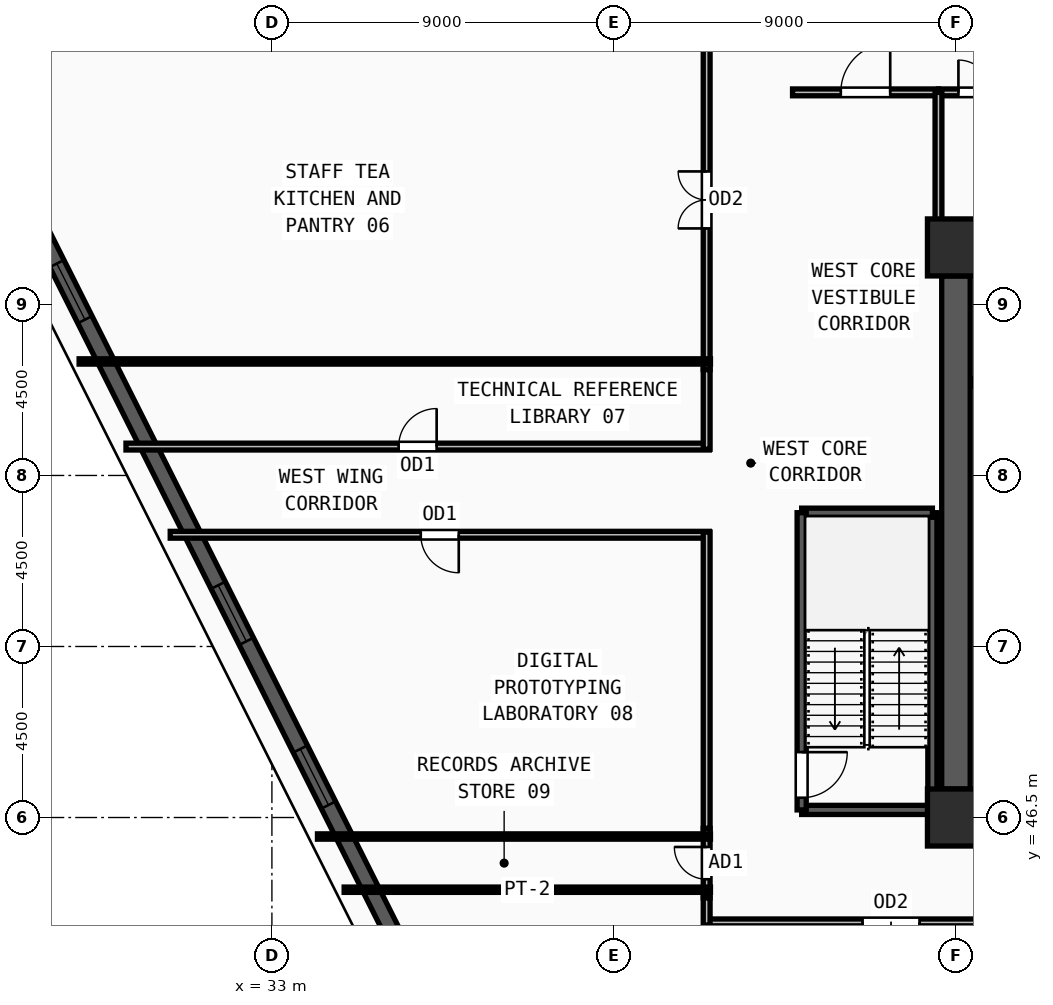
"""IFC4 building model, lengths in metres.
Left out: names, types, materials, properties, quantities, classifications, styles, units other than length and angle.
Written with IfcOpenShell. Run it as: python <this file> out.ifc"""

import sys

from ifc_helpers import new_model, si_unit, direction, frame, frame_2d, origin, origin_2d, place, context, subcontext, project, spatial, rectangle, extrude, source, transform, mapped, element, fill, save


model = new_model("IFC4")
c1 = context("Model", 3, precision=1e-05, world=origin(), true_north=direction((0.0, 1.0)))
c2 = subcontext(c1, "Body", "Model", "MODEL_VIEW")
j1 = project(units=[si_unit("LENGTHUNIT", "METRE"), si_unit("PLANEANGLEUNIT", "RADIAN")], contexts=[c1])
p1 = place(None, origin())
s1 = spatial("IfcSite", under=j1, at=p1, CompositionType="ELEMENT")
p2 = place(p1, origin())
s2 = spatial("IfcBuilding", under=s1, at=p2, CompositionType="ELEMENT")
p3 = place(p2, frame((0.0, 0.0, 124.5)))
s3 = spatial("IfcBuildingStorey", under=s2, at=p3, CompositionType="ELEMENT", Elevation=124.5)
m1 = source(origin(), c2, "Body", "SweptSolid", [
    extrude(rectangle(XDim=1.5, YDim=1.5, at=origin_2d()), origin(), (0.0, 0.0, 1.0), 3.75),
])
for number, where, z_axis, x_axis in (
    (1, (51.0, 46.5, 0.0), (0.0, 0.0, 1.0), (1.0, 0.0, 0.0)),
    (2, (51.0, 61.5, 0.0), (0.0, 0.0, 1.0), (1.0, 0.0, 0.0)),
):
    element("IfcColumn", number, at=place(p3, frame(where, z_axis=z_axis, x_axis=x_axis)), inside=s3, PredefinedType="COLUMN", context=c2, shape_type="MappedRepresentation", body=[
        mapped(m1, transform((0.0, 0.0, 0.0), x_axis=(1.0, 0.0, 0.0), y_axis=(0.0, 1.0, 0.0), z_axis=(0.0, 0.0, 1.0), scale=1.0)),
    ])
p4 = place(p3, frame((24.158, 67.415, 0.0), z_axis=(0.0, 0.0, 1.0), x_axis=(0.448489429893, -0.893788135564, 0.0)))
e3 = element("IfcWall", 3, at=p4, inside=s3, PredefinedType="SOLIDWALL", context=c2, shape_type="SweptSolid", body=[
    extrude(rectangle(XDim=31.677, YDim=0.42, at=frame_2d((15.839, 0.0))), origin(), (0.0, 0.0, 1.0), 3.57),
])
m2 = source(origin(), c2, "Body", "SweptSolid", [
    extrude(rectangle(XDim=1.65, YDim=1.95, at=frame_2d((0.825, 0.975))), frame((0.0, 0.22, 0.0), z_axis=(0.0, -1.0, 0.0), x_axis=(1.0, 0.0, 0.0)), (0.0, 0.0, 1.0), 0.44),
])
p5 = place(p4, frame((7.094, 0.0, 0.55)))
e4 = element("IfcOpeningElement", 4, at=p5, cuts=e3, PredefinedType="OPENING", context=c2, shape_type="MappedRepresentation", body=[
    mapped(m2, transform((0.0, 0.0, 0.0), x_axis=(1.0, 0.0, 0.0), y_axis=(0.0, 1.0, 0.0), z_axis=(0.0, 0.0, 1.0), scale=1.0)),
])
p6 = place(p4, frame((16.564, 0.0, 0.55)))
e5 = element("IfcOpeningElement", 5, at=p6, cuts=e3, PredefinedType="OPENING", context=c2, shape_type="MappedRepresentation", body=[
    mapped(m2, transform((0.0, 0.0, 0.0), x_axis=(1.0, 0.0, 0.0), y_axis=(0.0, 1.0, 0.0), z_axis=(0.0, 0.0, 1.0), scale=1.0)),
])
p7 = place(p4, frame((21.383, 0.0, 0.55)))
e6 = element("IfcOpeningElement", 6, at=p7, cuts=e3, PredefinedType="OPENING", context=c2, shape_type="MappedRepresentation", body=[
    mapped(m2, transform((0.0, 0.0, 0.0), x_axis=(1.0, 0.0, 0.0), y_axis=(0.0, 1.0, 0.0), z_axis=(0.0, 0.0, 1.0), scale=1.0)),
])
p8 = place(p3, frame((51.0, 47.25, 0.0), z_axis=(0.0, 0.0, 1.0), x_axis=(0.0, 1.0, 0.0)))
e7 = element("IfcWall", 7, at=p8, inside=s3, PredefinedType="SHEAR", context=c2, shape_type="SweptSolid", body=[
    extrude(rectangle(XDim=13.5, YDim=0.75, at=frame_2d((6.75, 0.0))), origin(), (0.0, 0.0, 1.0), 3.57),
])
p9 = place(p3, frame((46.94, 46.7, 0.0), z_axis=(0.0, 0.0, 1.0), x_axis=(1.0, 0.0, 0.0)))
e8 = element("IfcWall", 8, at=p9, inside=s3, PredefinedType="SOLIDWALL", context=c2, shape_type="SweptSolid", body=[
    extrude(rectangle(XDim=3.44, YDim=0.24, at=frame_2d((1.72, 0.0))), origin(), (0.0, 0.0, 1.0), 3.57),
])
p10 = place(p3, frame((50.38, 46.7, 0.0), z_axis=(0.0, 0.0, 1.0), x_axis=(0.0, 1.0, 0.0)))
e9 = element("IfcWall", 9, at=p10, inside=s3, PredefinedType="SOLIDWALL", context=c2, shape_type="SweptSolid", body=[
    extrude(rectangle(XDim=7.82, YDim=0.24, at=frame_2d((3.91, 0.0))), origin(), (0.0, 0.0, 1.0), 3.57),
])
p11 = place(p3, frame((50.38, 54.52, 0.0), z_axis=(0.0, 0.0, 1.0), x_axis=(-1.0, 0.0, 0.0)))
e10 = element("IfcWall", 10, at=p11, inside=s3, PredefinedType="SOLIDWALL", context=c2, shape_type="SweptSolid", body=[
    extrude(rectangle(XDim=3.44, YDim=0.24, at=frame_2d((1.72, 0.0))), origin(), (0.0, 0.0, 1.0), 3.57),
])
p12 = place(p3, frame((46.94, 54.52, 0.0), z_axis=(0.0, 0.0, 1.0), x_axis=(0.0, -1.0, 0.0)))
e11 = element("IfcWall", 11, at=p12, inside=s3, PredefinedType="SOLIDWALL", context=c2, shape_type="SweptSolid", body=[
    extrude(rectangle(XDim=7.82, YDim=0.24, at=frame_2d((3.91, 0.0))), origin(), (0.0, 0.0, 1.0), 3.57),
])
m3 = source(origin(), c2, "Body", "SweptSolid", [
    extrude(rectangle(XDim=1.2, YDim=2.2, at=frame_2d((0.6, 1.1))), frame((0.0, 0.13, 0.0), z_axis=(0.0, -1.0, 0.0), x_axis=(1.0, 0.0, 0.0)), (0.0, 0.0, 1.0), 0.26),
])
p13 = place(p12, frame((6.3, 0.0, 0.0)))
e12 = element("IfcOpeningElement", 12, at=p13, cuts=e11, PredefinedType="OPENING", context=c2, shape_type="MappedRepresentation", body=[
    mapped(m3, transform((0.0, 0.0, 0.0), x_axis=(1.0, 0.0, 0.0), y_axis=(0.0, 1.0, 0.0), z_axis=(0.0, 0.0, 1.0), scale=1.0)),
])
for number, where, z_axis, x_axis in (
    (13, (51.4, 57.95, 0.0), (0.0, 0.0, 1.0), (1.0, 0.0, 0.0)),
    (14, (53.8, 60.88, 0.0), (0.0, 0.0, 1.0), (-1.0, 0.0, 0.0)),
):
    element("IfcWall", number, at=place(p3, frame(where, z_axis=z_axis, x_axis=x_axis)), inside=s3, PredefinedType="SOLIDWALL", context=c2, shape_type="SweptSolid", body=[
        extrude(rectangle(XDim=2.4, YDim=0.2, at=frame_2d((1.2, 0.0))), origin(), (0.0, 0.0, 1.0), 3.57),
    ])
p14 = place(p3, frame((50.54, 65.58, 0.0), z_axis=(0.0, 0.0, 1.0), x_axis=(1.0, 0.0, 0.0)))
e15 = element("IfcWall", 15, at=p14, inside=s3, PredefinedType="PARTITIONING", context=c2, shape_type="SweptSolid", body=[
    extrude(rectangle(XDim=1.9, YDim=0.18, at=frame_2d((0.95, 0.0))), origin(), (0.0, 0.0, 1.0), 3.57),
])
m4 = source(origin(), c2, "Body", "SweptSolid", [
    extrude(rectangle(XDim=0.85, YDim=2.1, at=frame_2d((0.425, 1.05))), frame((0.0, 0.1, 0.0), z_axis=(0.0, -1.0, 0.0), x_axis=(1.0, 0.0, 0.0)), (0.0, 0.0, 1.0), 0.2),
])
p15 = place(p14, frame((0.525, 0.0, 0.0)))
e16 = element("IfcOpeningElement", 16, at=p15, cuts=e15, PredefinedType="OPENING", context=c2, shape_type="MappedRepresentation", body=[
    mapped(m4, transform((0.0, 0.0, 0.0), x_axis=(1.0, 0.0, 0.0), y_axis=(0.0, 1.0, 0.0), z_axis=(0.0, 0.0, 1.0), scale=1.0)),
])
p16 = place(p3, frame((46.7, 65.58, 0.0), z_axis=(0.0, 0.0, 1.0), x_axis=(1.0, 0.0, 0.0)))
e17 = element("IfcWall", 17, at=p16, inside=s3, PredefinedType="PARTITIONING", context=c2, shape_type="SweptSolid", body=[
    extrude(rectangle(XDim=3.84, YDim=0.18, at=frame_2d((1.92, 0.0))), origin(), (0.0, 0.0, 1.0), 3.57),
])
m5 = source(origin(), c2, "Body", "SweptSolid", [
    extrude(rectangle(XDim=1.3, YDim=2.2, at=frame_2d((0.65, 1.1))), frame((0.0, 0.1, 0.0), z_axis=(0.0, -1.0, 0.0), x_axis=(1.0, 0.0, 0.0)), (0.0, 0.0, 1.0), 0.2),
])
p17 = place(p16, frame((1.27, 0.0, 0.0)))
e18 = element("IfcOpeningElement", 18, at=p17, cuts=e17, PredefinedType="OPENING", context=c2, shape_type="MappedRepresentation", body=[
    mapped(m5, transform((0.0, 0.0, 0.0), x_axis=(1.0, 0.0, 0.0), y_axis=(0.0, 1.0, 0.0), z_axis=(0.0, 0.0, 1.0), scale=1.0)),
])
p18 = place(p3, frame((44.44, 58.285, 0.0), z_axis=(0.0, 0.0, 1.0), x_axis=(0.0, 1.0, 0.0)))
e19 = element("IfcWall", 19, at=p18, inside=s3, PredefinedType="PARTITIONING", context=c2, shape_type="SweptSolid", body=[
    extrude(rectangle(XDim=8.93, YDim=0.18, at=frame_2d((4.465, 0.0))), origin(), (0.0, 0.0, 1.0), 3.57),
])
m6 = source(origin(), c2, "Body", "SweptSolid", [
    extrude(rectangle(XDim=1.5, YDim=2.2, at=frame_2d((0.75, 1.1))), frame((0.0, 0.1, 0.0), z_axis=(0.0, -1.0, 0.0), x_axis=(1.0, 0.0, 0.0)), (0.0, 0.0, 1.0), 0.2),
])
p19 = place(p18, frame((3.715, 0.0, 0.0)))
e20 = element("IfcOpeningElement", 20, at=p19, cuts=e19, PredefinedType="OPENING", context=c2, shape_type="MappedRepresentation", body=[
    mapped(m6, transform((0.0, 0.0, 0.0), x_axis=(1.0, 0.0, 0.0), y_axis=(0.0, 1.0, 0.0), z_axis=(0.0, 0.0, 1.0), scale=1.0)),
])
p20 = place(p3, frame((29.16, 56.26, 0.0), z_axis=(0.0, 0.0, 1.0), x_axis=(1.0, 0.0, 0.0)))
e21 = element("IfcWall", 21, at=p20, inside=s3, PredefinedType="PARTITIONING", context=c2, shape_type="SweptSolid", body=[
    extrude(rectangle(XDim=15.35, YDim=0.18, at=frame_2d((7.675, 0.0))), origin(), (0.0, 0.0, 1.0), 3.57),
])
m7 = source(origin(), c2, "Body", "SweptSolid", [
    extrude(rectangle(XDim=1.0, YDim=2.2, at=frame_2d((0.5, 1.1))), frame((0.0, 0.1, 0.0), z_axis=(0.0, -1.0, 0.0), x_axis=(1.0, 0.0, 0.0)), (0.0, 0.0, 1.0), 0.2),
])
p21 = place(p20, frame((7.175, 0.0, 0.0)))
e22 = element("IfcOpeningElement", 22, at=p21, cuts=e21, PredefinedType="OPENING", context=c2, shape_type="MappedRepresentation", body=[
    mapped(m7, transform((0.0, 0.0, 0.0), x_axis=(1.0, 0.0, 0.0), y_axis=(0.0, 1.0, 0.0), z_axis=(0.0, 0.0, 1.0), scale=1.0)),
])
p22 = place(p3, frame((44.51, 53.94, 0.0), z_axis=(0.0, 0.0, 1.0), x_axis=(-1.0, 0.0, 0.0)))
e23 = element("IfcWall", 23, at=p22, inside=s3, PredefinedType="PARTITIONING", context=c2, shape_type="SweptSolid", body=[
    extrude(rectangle(XDim=14.186, YDim=0.18, at=frame_2d((7.093, 0.0))), origin(), (0.0, 0.0, 1.0), 3.57),
])
p23 = place(p22, frame((6.593, 0.0, 0.0)))
e24 = element("IfcOpeningElement", 24, at=p23, cuts=e23, PredefinedType="OPENING", context=c2, shape_type="MappedRepresentation", body=[
    mapped(m7, transform((0.0, 0.0, 0.0), x_axis=(1.0, 0.0, 0.0), y_axis=(0.0, 1.0, 0.0), z_axis=(0.0, 0.0, 1.0), scale=1.0)),
])
p24 = place(p3, frame((44.44, 44.385, 0.0), z_axis=(0.0, 0.0, 1.0), x_axis=(0.0, 1.0, 0.0)))
e25 = element("IfcWall", 25, at=p24, inside=s3, PredefinedType="PARTITIONING", context=c2, shape_type="SweptSolid", body=[
    extrude(rectangle(XDim=1.83, YDim=0.18, at=frame_2d((0.915, 0.0))), origin(), (0.0, 0.0, 1.0), 3.57),
])
p25 = place(p24, frame((0.49, 0.0, 0.0)))
e26 = element("IfcOpeningElement", 26, at=p25, cuts=e25, PredefinedType="OPENING", context=c2, shape_type="MappedRepresentation", body=[
    mapped(m4, transform((0.0, 0.0, 0.0), x_axis=(1.0, 0.0, 0.0), y_axis=(0.0, 1.0, 0.0), z_axis=(0.0, 0.0, 1.0), scale=1.0)),
])
p26 = place(p3, frame((54.215, 43.74, 0.0), z_axis=(0.0, 0.0, 1.0), x_axis=(-1.0, 0.0, 0.0)))
e27 = element("IfcWall", 27, at=p26, inside=s3, PredefinedType="PARTITIONING", context=c2, shape_type="SweptSolid", body=[
    extrude(rectangle(XDim=9.845, YDim=0.18, at=frame_2d((4.922, 0.0))), origin(), (0.0, 0.0, 1.0), 3.57),
])
p27 = place(p26, frame((4.173, 0.0, 0.0)))
e28 = element("IfcOpeningElement", 28, at=p27, cuts=e27, PredefinedType="OPENING", context=c2, shape_type="MappedRepresentation", body=[
    mapped(m6, transform((0.0, 0.0, 0.0), x_axis=(1.0, 0.0, 0.0), y_axis=(0.0, 1.0, 0.0), z_axis=(0.0, 0.0, 1.0), scale=1.0)),
])
p28 = place(p3, frame((50.54, 61.95, 0.0), z_axis=(0.0, 0.0, 1.0), x_axis=(0.0, 1.0, 0.0)))
e29 = element("IfcWall", 29, at=p28, inside=s3, PredefinedType="PARTITIONING", context=c2, shape_type="SweptSolid", body=[
    extrude(rectangle(XDim=3.63, YDim=0.18, at=frame_2d((1.815, 0.0))), origin(), (0.0, 0.0, 1.0), 3.57),
])
p29 = place(p3, frame((44.44, 56.19, 0.0), z_axis=(0.0, 0.0, 1.0), x_axis=(0.0, 1.0, 0.0)))
e30 = element("IfcWall", 30, at=p29, inside=s3, PredefinedType="PARTITIONING", context=c2, shape_type="SweptSolid", body=[
    extrude(rectangle(XDim=2.095, YDim=0.18, at=frame_2d((1.047, 0.0))), origin(), (0.0, 0.0, 1.0), 3.57),
])
p30 = place(p3, frame((44.44, 46.215, 0.0), z_axis=(0.0, 0.0, 1.0), x_axis=(0.0, 1.0, 0.0)))
e31 = element("IfcWall", 31, at=p30, inside=s3, PredefinedType="PARTITIONING", context=c2, shape_type="SweptSolid", body=[
    extrude(rectangle(XDim=7.795, YDim=0.18, at=frame_2d((3.897, 0.0))), origin(), (0.0, 0.0, 1.0), 3.57),
])
p31 = place(p3, frame((44.44, 43.67, 0.0), z_axis=(0.0, 0.0, 1.0), x_axis=(0.0, 1.0, 0.0)))
e32 = element("IfcWall", 32, at=p31, inside=s3, PredefinedType="PARTITIONING", context=c2, shape_type="SweptSolid", body=[
    extrude(rectangle(XDim=0.715, YDim=0.18, at=frame_2d((0.357, 0.0))), origin(), (0.0, 0.0, 1.0), 3.57),
])
p32 = place(p3, frame((44.54, 44.6, 0.0), z_axis=(0.0, 0.0, 1.0), x_axis=(-1.0, 0.0, 0.0)))
e33 = element("IfcWall", 33, at=p32, inside=s3, PredefinedType="PARTITIONING", context=c2, shape_type="SweptSolid", body=[
    extrude(rectangle(XDim=9.639, YDim=0.14, at=frame_2d((4.82, 0.0))), origin(), (0.0, 0.0, 1.0), 3.57),
])
p33 = place(p3, frame((44.54, 46.0, 0.0), z_axis=(0.0, 0.0, 1.0), x_axis=(-1.0, 0.0, 0.0)))
e34 = element("IfcWall", 34, at=p33, inside=s3, PredefinedType="PARTITIONING", context=c2, shape_type="SweptSolid", body=[
    extrude(rectangle(XDim=10.341, YDim=0.14, at=frame_2d((5.17, 0.0))), origin(), (0.0, 0.0, 1.0), 3.57),
])
p34 = place(p3, frame((44.54, 58.5, 0.0), z_axis=(0.0, 0.0, 1.0), x_axis=(-1.0, 0.0, 0.0)))
e35 = element("IfcWall", 35, at=p34, inside=s3, PredefinedType="PARTITIONING", context=c2, shape_type="SweptSolid", body=[
    extrude(rectangle(XDim=16.613, YDim=0.14, at=frame_2d((8.307, 0.0))), origin(), (0.0, 0.0, 1.0), 3.57),
])
m8 = source(origin(), c2, "Body", "SweptSolid", [
    extrude(rectangle(XDim=1.65, YDim=1.95, at=frame_2d((0.825, 0.975))), frame((0.0, 0.03, 0.0), z_axis=(0.0, -1.0, 0.0), x_axis=(1.0, 0.0, 0.0)), (0.0, 0.0, 1.0), 0.06),
])
p35 = place(p5, origin())
e36 = element("IfcWindow", 36, at=p35, inside=s3, PartitioningType="DOUBLE_PANEL_VERTICAL", PredefinedType="WINDOW", context=c2, shape_type="MappedRepresentation", body=[
    mapped(m8, transform((0.0, 0.0, 0.0), x_axis=(1.0, 0.0, 0.0), y_axis=(0.0, 1.0, 0.0), z_axis=(0.0, 0.0, 1.0), scale=1.0)),
])
fill(e4, e36)
p36 = place(p6, origin())
e37 = element("IfcWindow", 37, at=p36, inside=s3, PartitioningType="DOUBLE_PANEL_VERTICAL", PredefinedType="WINDOW", context=c2, shape_type="MappedRepresentation", body=[
    mapped(m8, transform((0.0, 0.0, 0.0), x_axis=(1.0, 0.0, 0.0), y_axis=(0.0, 1.0, 0.0), z_axis=(0.0, 0.0, 1.0), scale=1.0)),
])
fill(e5, e37)
p37 = place(p7, origin())
e38 = element("IfcWindow", 38, at=p37, inside=s3, PartitioningType="DOUBLE_PANEL_VERTICAL", PredefinedType="WINDOW", context=c2, shape_type="MappedRepresentation", body=[
    mapped(m8, transform((0.0, 0.0, 0.0), x_axis=(1.0, 0.0, 0.0), y_axis=(0.0, 1.0, 0.0), z_axis=(0.0, 0.0, 1.0), scale=1.0)),
])
fill(e6, e38)
m9 = source(origin(), c2, "Body", "SweptSolid", [
    extrude(rectangle(XDim=1.2, YDim=2.2, at=frame_2d((0.6, 1.1))), frame((0.0, 0.025, 0.0), z_axis=(0.0, -1.0, 0.0), x_axis=(1.0, 0.0, 0.0)), (0.0, 0.0, 1.0), 0.05),
])
p38 = place(p13, origin())
e39 = element("IfcDoor", 39, at=p38, inside=s3, OperationType="SINGLE_SWING_LEFT", PredefinedType="DOOR", context=c2, shape_type="MappedRepresentation", body=[
    mapped(m9, transform((0.0, 0.0, 0.0), x_axis=(1.0, 0.0, 0.0), y_axis=(0.0, 1.0, 0.0), z_axis=(0.0, 0.0, 1.0), scale=1.0)),
])
fill(e12, e39)
m10 = source(origin(), c2, "Body", "SweptSolid", [
    extrude(rectangle(XDim=0.85, YDim=2.1, at=frame_2d((0.425, 1.05))), frame((0.0, 0.025, 0.0), z_axis=(0.0, -1.0, 0.0), x_axis=(1.0, 0.0, 0.0)), (0.0, 0.0, 1.0), 0.05),
])
p39 = place(p15, origin())
e40 = element("IfcDoor", 40, at=p39, inside=s3, OperationType="SINGLE_SWING_LEFT", PredefinedType="DOOR", context=c2, shape_type="MappedRepresentation", body=[
    mapped(m10, transform((0.0, 0.0, 0.0), x_axis=(1.0, 0.0, 0.0), y_axis=(0.0, 1.0, 0.0), z_axis=(0.0, 0.0, 1.0), scale=1.0)),
])
fill(e16, e40)
m11 = source(origin(), c2, "Body", "SweptSolid", [
    extrude(rectangle(XDim=1.3, YDim=2.2, at=frame_2d((0.65, 1.1))), frame((0.0, 0.025, 0.0), z_axis=(0.0, -1.0, 0.0), x_axis=(1.0, 0.0, 0.0)), (0.0, 0.0, 1.0), 0.05),
])
p40 = place(p17, origin())
e41 = element("IfcDoor", 41, at=p40, inside=s3, OperationType="SINGLE_SWING_RIGHT", PredefinedType="DOOR", context=c2, shape_type="MappedRepresentation", body=[
    mapped(m11, transform((0.0, 0.0, 0.0), x_axis=(1.0, 0.0, 0.0), y_axis=(0.0, 1.0, 0.0), z_axis=(0.0, 0.0, 1.0), scale=1.0)),
])
fill(e18, e41)
m12 = source(origin(), c2, "Body", "SweptSolid", [
    extrude(rectangle(XDim=1.5, YDim=2.2, at=frame_2d((0.75, 1.1))), frame((0.0, 0.025, 0.0), z_axis=(0.0, -1.0, 0.0), x_axis=(1.0, 0.0, 0.0)), (0.0, 0.0, 1.0), 0.05),
])
p41 = place(p19, origin())
e42 = element("IfcDoor", 42, at=p41, inside=s3, OperationType="DOUBLE_DOOR_SINGLE_SWING", PredefinedType="DOOR", context=c2, shape_type="MappedRepresentation", body=[
    mapped(m12, transform((0.0, 0.0, 0.0), x_axis=(1.0, 0.0, 0.0), y_axis=(0.0, 1.0, 0.0), z_axis=(0.0, 0.0, 1.0), scale=1.0)),
])
fill(e20, e42)
m13 = source(origin(), c2, "Body", "SweptSolid", [
    extrude(rectangle(XDim=1.0, YDim=2.2, at=frame_2d((0.5, 1.1))), frame((0.0, 0.025, 0.0), z_axis=(0.0, -1.0, 0.0), x_axis=(1.0, 0.0, 0.0)), (0.0, 0.0, 1.0), 0.05),
])
p42 = place(p21, origin())
e43 = element("IfcDoor", 43, at=p42, inside=s3, OperationType="SINGLE_SWING_RIGHT", PredefinedType="DOOR", context=c2, shape_type="MappedRepresentation", body=[
    mapped(m13, transform((0.0, 0.0, 0.0), x_axis=(1.0, 0.0, 0.0), y_axis=(0.0, 1.0, 0.0), z_axis=(0.0, 0.0, 1.0), scale=1.0)),
])
fill(e22, e43)
p43 = place(p23, origin())
e44 = element("IfcDoor", 44, at=p43, inside=s3, OperationType="SINGLE_SWING_LEFT", PredefinedType="DOOR", context=c2, shape_type="MappedRepresentation", body=[
    mapped(m13, transform((0.0, 0.0, 0.0), x_axis=(1.0, 0.0, 0.0), y_axis=(0.0, 1.0, 0.0), z_axis=(0.0, 0.0, 1.0), scale=1.0)),
])
fill(e24, e44)
p44 = place(p25, origin())
e45 = element("IfcDoor", 45, at=p44, inside=s3, OperationType="SINGLE_SWING_RIGHT", PredefinedType="DOOR", context=c2, shape_type="MappedRepresentation", body=[
    mapped(m10, transform((0.0, 0.0, 0.0), x_axis=(1.0, 0.0, 0.0), y_axis=(0.0, 1.0, 0.0), z_axis=(0.0, 0.0, 1.0), scale=1.0)),
])
fill(e26, e45)
p45 = place(p27, origin())
e46 = element("IfcDoor", 46, at=p45, inside=s3, OperationType="DOUBLE_DOOR_SINGLE_SWING", PredefinedType="DOOR", context=c2, shape_type="MappedRepresentation", body=[
    mapped(m12, transform((0.0, 0.0, 0.0), x_axis=(1.0, 0.0, 0.0), y_axis=(0.0, 1.0, 0.0), z_axis=(0.0, 0.0, 1.0), scale=1.0)),
])
fill(e28, e46)
save(model, sys.argv[1])
